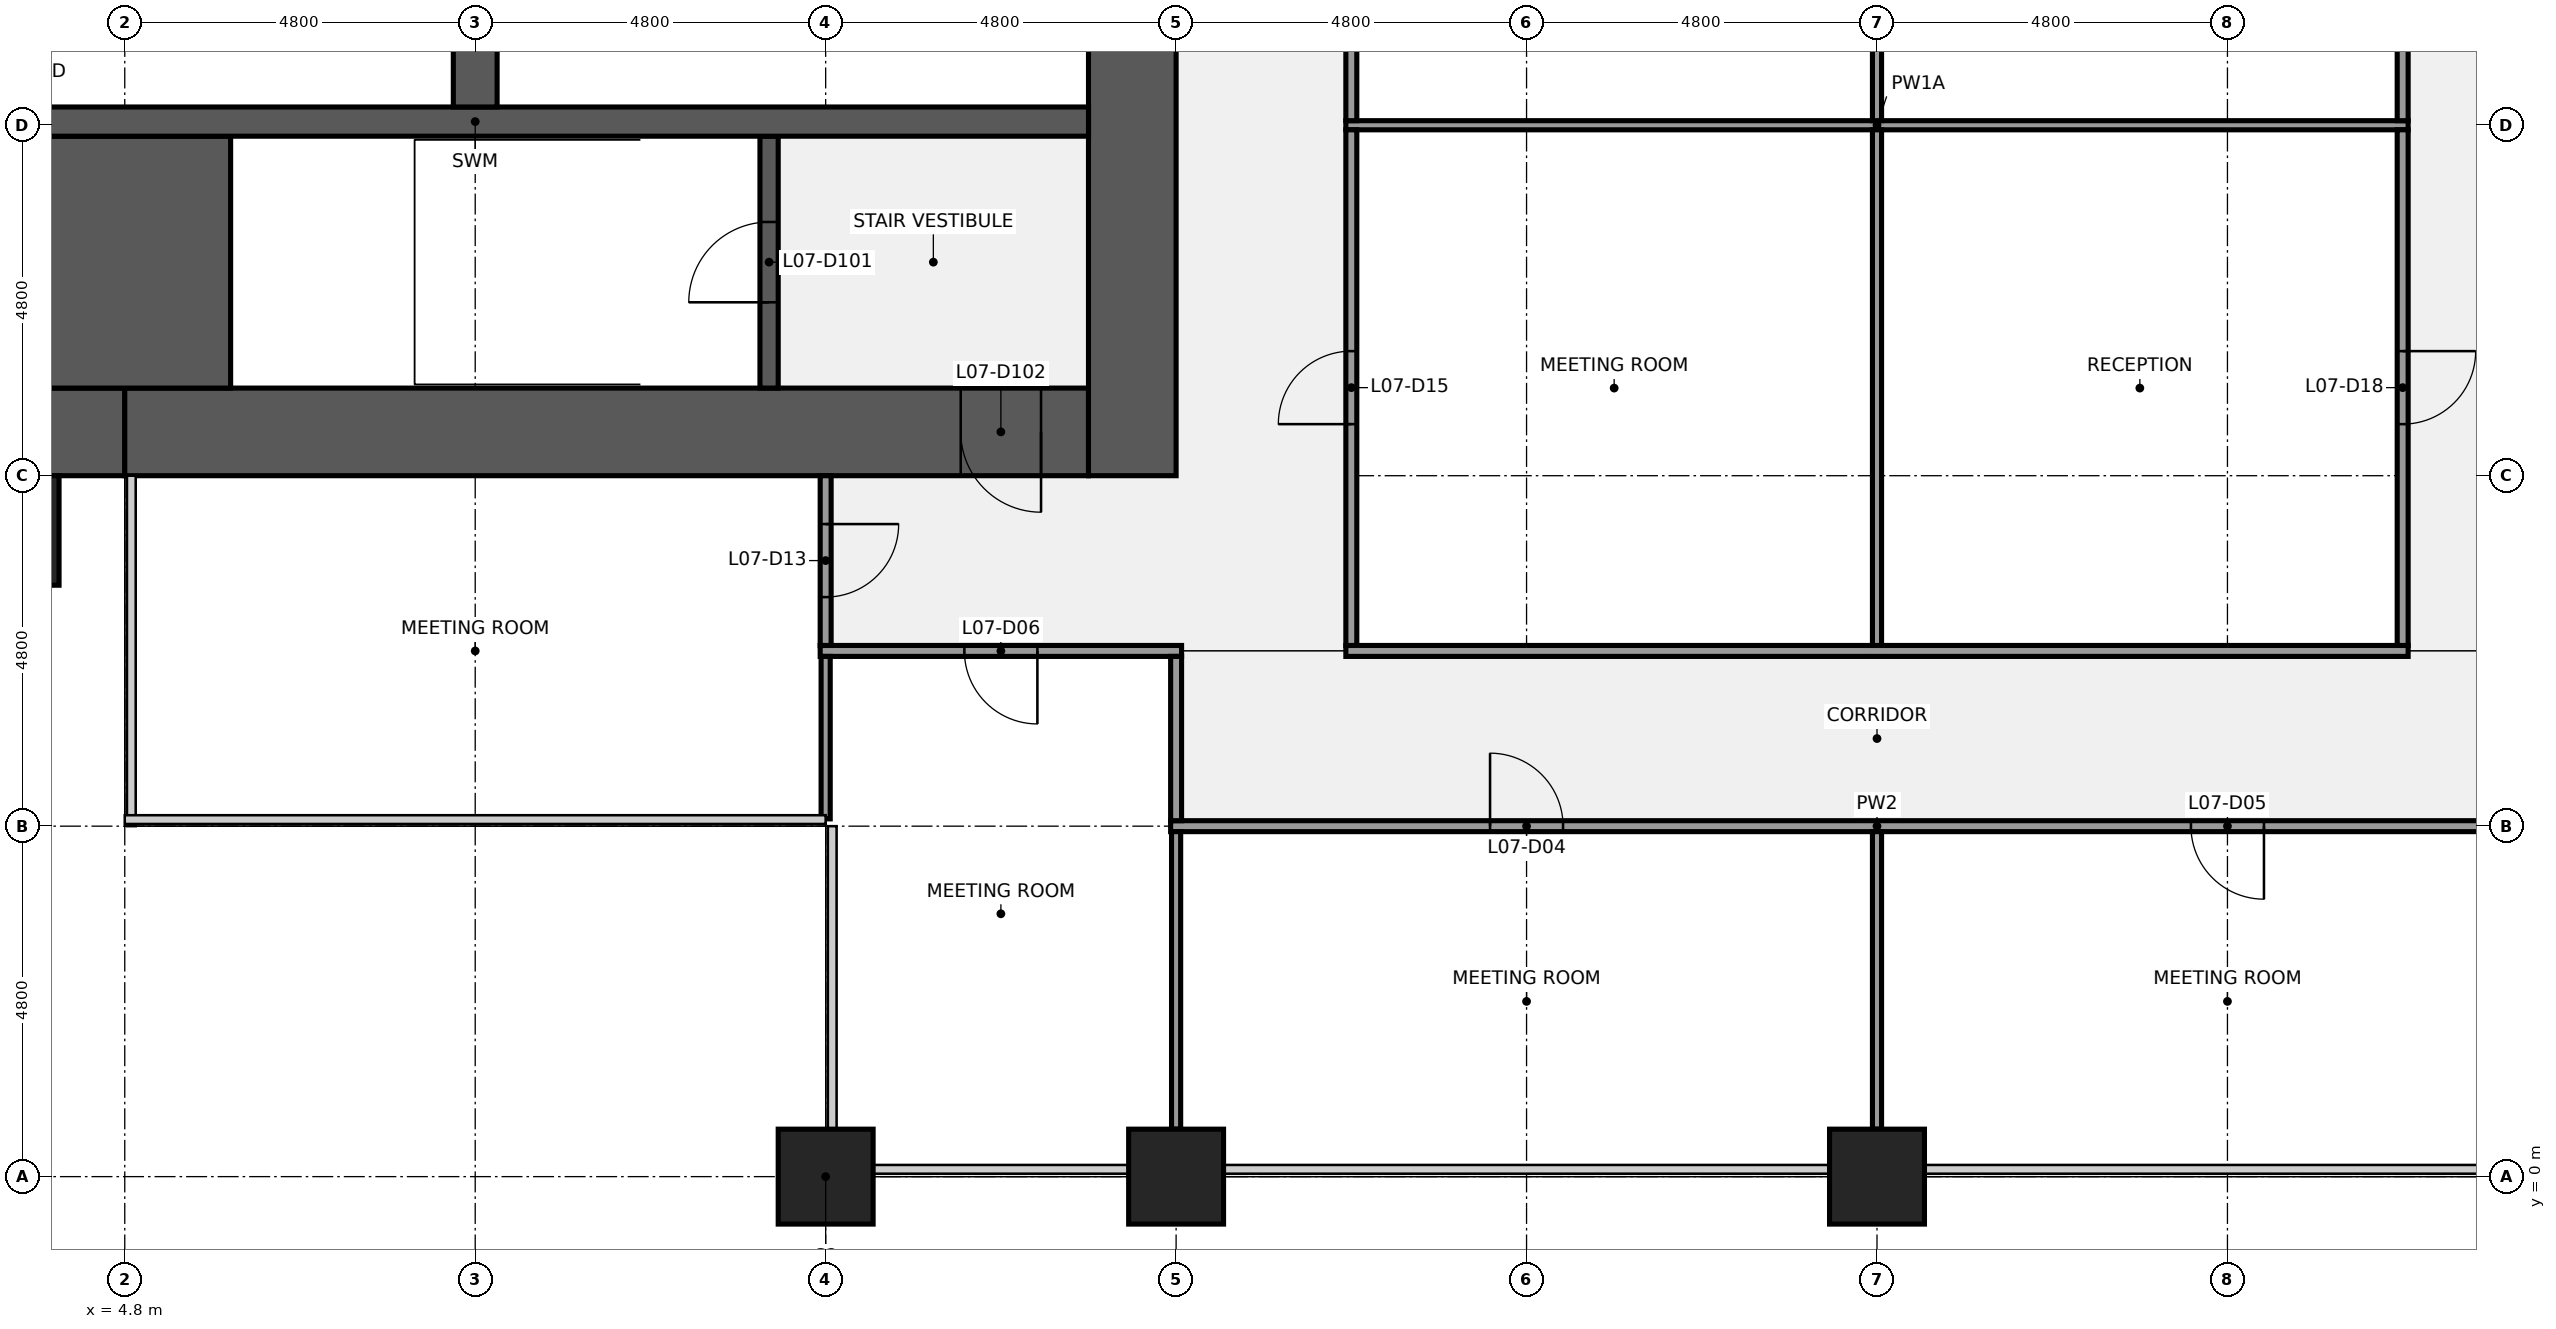
"""IFC4 building model, lengths in metres.
Left out: names, types, materials, properties, quantities, classifications, styles, units other than length and angle.
Written with IfcOpenShell. Run it as: python <this file> out.ifc"""

import sys

from ifc_helpers import new_model, si_unit, direction, frame, frame_2d, origin, origin_2d, place, context, subcontext, project, spatial, rectangle, extrude, element, fill, save


model = new_model("IFC4")
c1 = context("Model", 3, precision=1e-05, world=origin(), true_north=direction((0.0, 1.0)))
c2 = subcontext(c1, "Body", "Model", "MODEL_VIEW")
j1 = project(units=[si_unit("LENGTHUNIT", "METRE"), si_unit("PLANEANGLEUNIT", "RADIAN")], contexts=[c1])
p1 = place(None, origin())
s1 = spatial("IfcSite", under=j1, at=p1, CompositionType="ELEMENT")
p2 = place(p1, origin())
s2 = spatial("IfcBuilding", under=s1, at=p2, CompositionType="ELEMENT")
p3 = place(p2, frame((0.0, 0.0, 39.0)))
s3 = spatial("IfcBuildingStorey", under=s2, at=p3, CompositionType="ELEMENT", Elevation=39.0)
for number, where, z_axis, x_axis in (
    (1, (14.4, 0.0, 0.0), (0.0, 0.0, 1.0), (1.0, 0.0, 0.0)),
    (2, (19.2, 0.0, 0.0), (0.0, 0.0, 1.0), (1.0, 0.0, 0.0)),
    (3, (28.8, 0.0, 0.0), (0.0, 0.0, 1.0), (1.0, 0.0, 0.0)),
):
    element("IfcColumn", number, at=place(p3, frame(where, z_axis=z_axis, x_axis=x_axis)), inside=s3, PredefinedType="COLUMN", context=c2, shape_type="SweptSolid", body=[
        extrude(rectangle(XDim=1.3, YDim=1.3, at=origin_2d()), origin(), (0.0, 0.0, 1.0), 4.0),
    ])
p4 = place(p3, frame((4.8, 10.2, 0.0), z_axis=(0.0, 0.0, 1.0), x_axis=(-1.0, 0.0, 0.0)))
e4 = element("IfcWall", 4, at=p4, inside=s3, PredefinedType="SHEAR", context=c2, shape_type="SweptSolid", body=[
    extrude(rectangle(XDim=3.6, YDim=1.2, at=frame_2d((1.8, 0.0))), origin(), (0.0, 0.0, 1.0), 3.84),
])
p5 = place(p3, frame((18.0, 10.2, 0.0), z_axis=(0.0, 0.0, 1.0), x_axis=(-1.0, 0.0, 0.0)))
e5 = element("IfcWall", 5, at=p5, inside=s3, PredefinedType="SHEAR", context=c2, shape_type="SweptSolid", body=[
    extrude(rectangle(XDim=13.2, YDim=1.2, at=frame_2d((6.6, 0.0))), origin(), (0.0, 0.0, 1.0), 3.84),
])
p6 = place(p5, frame((0.65, 0.0, 0.0)))
e6 = element("IfcOpeningElement", 6, at=p6, cuts=e5, PredefinedType="OPENING", context=c2, shape_type="SweptSolid", body=[
    extrude(rectangle(XDim=1.1, YDim=2.1, at=frame_2d((0.55, 1.05))), frame((0.0, 0.61, 0.0), z_axis=(0.0, -1.0, 0.0), x_axis=(1.0, 0.0, 0.0)), (0.0, 0.0, 1.0), 1.22),
])
p7 = place(p3, frame((18.6, 38.4, 0.0), z_axis=(0.0, 0.0, 1.0), x_axis=(0.0, -1.0, 0.0)))
e7 = element("IfcWall", 7, at=p7, inside=s3, PredefinedType="SHEAR", context=c2, shape_type="SweptSolid", body=[
    extrude(rectangle(XDim=28.8, YDim=1.2, at=frame_2d((14.4, 0.0))), origin(), (0.0, 0.0, 1.0), 3.84),
])
p8 = place(p7, frame((18.3, 0.0, 0.0)))
e8 = element("IfcOpeningElement", 8, at=p8, cuts=e7, PredefinedType="OPENING", context=c2, shape_type="SweptSolid", body=[
    extrude(rectangle(XDim=1.8, YDim=2.1, at=frame_2d((0.9, 1.05))), frame((0.0, 0.61, 0.0), z_axis=(0.0, -1.0, 0.0), x_axis=(1.0, 0.0, 0.0)), (0.0, 0.0, 1.0), 1.22),
])
p9 = place(p7, frame((8.7, 0.0, 0.0)))
e9 = element("IfcOpeningElement", 9, at=p9, cuts=e7, PredefinedType="OPENING", context=c2, shape_type="SweptSolid", body=[
    extrude(rectangle(XDim=1.8, YDim=2.1, at=frame_2d((0.9, 1.05))), frame((0.0, 0.61, 0.0), z_axis=(0.0, -1.0, 0.0), x_axis=(1.0, 0.0, 0.0)), (0.0, 0.0, 1.0), 1.22),
])
p10 = place(p3, frame((1.2, 12.525, 0.0), z_axis=(0.0, 0.0, 1.0), x_axis=(1.0, 0.0, 0.0)))
e10 = element("IfcWall", 10, at=p10, inside=s3, PredefinedType="SHEAR", context=c2, shape_type="SweptSolid", body=[
    extrude(rectangle(XDim=5.05, YDim=3.45, at=frame_2d((2.525, 0.0))), origin(), (0.0, 0.0, 1.0), 3.84),
])
p11 = place(p3, frame((13.625, 10.8, 0.0), z_axis=(0.0, 0.0, 1.0), x_axis=(0.0, 1.0, 0.0)))
e11 = element("IfcWall", 11, at=p11, inside=s3, PredefinedType="SHEAR", context=c2, shape_type="SweptSolid", body=[
    extrude(rectangle(XDim=3.45, YDim=0.25, at=frame_2d((1.725, 0.0))), origin(), (0.0, 0.0, 1.0), 3.84),
])
p12 = place(p11, frame((1.175, 0.0, 0.0)))
e12 = element("IfcOpeningElement", 12, at=p12, cuts=e11, PredefinedType="OPENING", context=c2, shape_type="SweptSolid", body=[
    extrude(rectangle(XDim=1.1, YDim=2.1, at=frame_2d((0.55, 1.05))), frame((0.0, 0.135, 0.0), z_axis=(0.0, -1.0, 0.0), x_axis=(1.0, 0.0, 0.0)), (0.0, 0.0, 1.0), 0.27),
])
p13 = place(p3, frame((1.2, 14.45, 0.0), z_axis=(0.0, 0.0, 1.0), x_axis=(1.0, 0.0, 0.0)))
e13 = element("IfcWall", 13, at=p13, inside=s3, PredefinedType="SHEAR", context=c2, shape_type="SweptSolid", body=[
    extrude(rectangle(XDim=16.8, YDim=0.4, at=frame_2d((8.4, 0.0))), origin(), (0.0, 0.0, 1.0), 3.84),
])
p14 = place(p3, frame((9.6, 14.65, 0.0), z_axis=(0.0, 0.0, 1.0), x_axis=(0.0, 1.0, 0.0)))
e14 = element("IfcWall", 14, at=p14, inside=s3, PredefinedType="SHEAR", context=c2, shape_type="SweptSolid", body=[
    extrude(rectangle(XDim=2.6, YDim=0.6, at=frame_2d((1.3, 0.0))), origin(), (0.0, 0.0, 1.0), 3.84),
])
p15 = place(p3, frame((19.125, 4.8, 0.0), z_axis=(0.0, 0.0, 1.0), x_axis=(1.0, 0.0, 0.0)))
e15 = element("IfcWall", 15, at=p15, inside=s3, PredefinedType="PARTITIONING", context=c2, shape_type="SweptSolid", body=[
    extrude(rectangle(XDim=19.35, YDim=0.15, at=frame_2d((9.675, 0.0))), origin(), (0.0, 0.0, 1.0), 2.87),
])
p16 = place(p15, frame((4.375, 0.0, 0.0)))
e16 = element("IfcOpeningElement", 16, at=p16, cuts=e15, PredefinedType="OPENING", context=c2, shape_type="SweptSolid", body=[
    extrude(rectangle(XDim=1.0, YDim=2.1, at=frame_2d((0.5, 1.05))), frame((0.0, 0.085, 0.0), z_axis=(0.0, -1.0, 0.0), x_axis=(1.0, 0.0, 0.0)), (0.0, 0.0, 1.0), 0.17),
])
p17 = place(p15, frame((13.975, 0.0, 0.0)))
e17 = element("IfcOpeningElement", 17, at=p17, cuts=e15, PredefinedType="OPENING", context=c2, shape_type="SweptSolid", body=[
    extrude(rectangle(XDim=1.0, YDim=2.1, at=frame_2d((0.5, 1.05))), frame((0.0, 0.085, 0.0), z_axis=(0.0, -1.0, 0.0), x_axis=(1.0, 0.0, 0.0)), (0.0, 0.0, 1.0), 0.17),
])
p18 = place(p3, frame((14.325, 7.2, 0.0), z_axis=(0.0, 0.0, 1.0), x_axis=(1.0, 0.0, 0.0)))
e18 = element("IfcWall", 18, at=p18, inside=s3, PredefinedType="PARTITIONING", context=c2, shape_type="SweptSolid", body=[
    extrude(rectangle(XDim=4.95, YDim=0.15, at=frame_2d((2.475, 0.0))), origin(), (0.0, 0.0, 1.0), 2.87),
])
p19 = place(p18, frame((1.975, 0.0, 0.0)))
e19 = element("IfcOpeningElement", 19, at=p19, cuts=e18, PredefinedType="OPENING", context=c2, shape_type="SweptSolid", body=[
    extrude(rectangle(XDim=1.0, YDim=2.1, at=frame_2d((0.5, 1.05))), frame((0.0, 0.085, 0.0), z_axis=(0.0, -1.0, 0.0), x_axis=(1.0, 0.0, 0.0)), (0.0, 0.0, 1.0), 0.17),
])
p20 = place(p3, frame((21.525, 7.2, 0.0), z_axis=(0.0, 0.0, 1.0), x_axis=(1.0, 0.0, 0.0)))
e20 = element("IfcWall", 20, at=p20, inside=s3, PredefinedType="PARTITIONING", context=c2, shape_type="SweptSolid", body=[
    extrude(rectangle(XDim=14.55, YDim=0.15, at=frame_2d((7.275, 0.0))), origin(), (0.0, 0.0, 1.0), 2.87),
])
p21 = place(p3, frame((21.525, 14.4, 0.0), z_axis=(0.0, 0.0, 1.0), x_axis=(1.0, 0.0, 0.0)))
e21 = element("IfcWall", 21, at=p21, inside=s3, PredefinedType="PARTITIONING", context=c2, shape_type="SweptSolid", body=[
    extrude(rectangle(XDim=14.55, YDim=0.125, at=frame_2d((7.275, 0.0))), origin(), (0.0, 0.0, 1.0), 2.87),
])
p22 = place(p3, frame((14.4, 4.9, 0.0), z_axis=(0.0, 0.0, 1.0), x_axis=(0.0, 1.0, 0.0)))
e22 = element("IfcWall", 22, at=p22, inside=s3, PredefinedType="PARTITIONING", context=c2, shape_type="SweptSolid", body=[
    extrude(rectangle(XDim=2.225, YDim=0.125, at=frame_2d((1.113, 0.0))), origin(), (0.0, 0.0, 1.0), 2.87),
])
p23 = place(p3, frame((14.4, 7.275, 0.0), z_axis=(0.0, 0.0, 1.0), x_axis=(0.0, 1.0, 0.0)))
e23 = element("IfcWall", 23, at=p23, inside=s3, PredefinedType="PARTITIONING", context=c2, shape_type="SweptSolid", body=[
    extrude(rectangle(XDim=2.325, YDim=0.15, at=frame_2d((1.163, 0.0))), origin(), (0.0, 0.0, 1.0), 2.87),
])
p24 = place(p23, frame((0.663, 0.0, 0.0)))
e24 = element("IfcOpeningElement", 24, at=p24, cuts=e23, PredefinedType="OPENING", context=c2, shape_type="SweptSolid", body=[
    extrude(rectangle(XDim=1.0, YDim=2.1, at=frame_2d((0.5, 1.05))), frame((0.0, 0.085, 0.0), z_axis=(0.0, -1.0, 0.0), x_axis=(1.0, 0.0, 0.0)), (0.0, 0.0, 1.0), 0.17),
])
p25 = place(p3, frame((19.2, 0.65, 0.0), z_axis=(0.0, 0.0, 1.0), x_axis=(0.0, 1.0, 0.0)))
e25 = element("IfcWall", 25, at=p25, inside=s3, PredefinedType="PARTITIONING", context=c2, shape_type="SweptSolid", body=[
    extrude(rectangle(XDim=4.075, YDim=0.125, at=frame_2d((2.038, 0.0))), origin(), (0.0, 0.0, 1.0), 2.87),
])
p26 = place(p3, frame((19.2, 4.875, 0.0), z_axis=(0.0, 0.0, 1.0), x_axis=(0.0, 1.0, 0.0)))
e26 = element("IfcWall", 26, at=p26, inside=s3, PredefinedType="PARTITIONING", context=c2, shape_type="SweptSolid", body=[
    extrude(rectangle(XDim=2.25, YDim=0.15, at=frame_2d((1.125, 0.0))), origin(), (0.0, 0.0, 1.0), 2.87),
])
p27 = place(p3, frame((21.6, 7.275, 0.0), z_axis=(0.0, 0.0, 1.0), x_axis=(0.0, 1.0, 0.0)))
e27 = element("IfcWall", 27, at=p27, inside=s3, PredefinedType="PARTITIONING", context=c2, shape_type="SweptSolid", body=[
    extrude(rectangle(XDim=7.062, YDim=0.15, at=frame_2d((3.531, 0.0))), origin(), (0.0, 0.0, 1.0), 2.87),
])
p28 = place(p27, frame((3.031, 0.0, 0.0)))
e28 = element("IfcOpeningElement", 28, at=p28, cuts=e27, PredefinedType="OPENING", context=c2, shape_type="SweptSolid", body=[
    extrude(rectangle(XDim=1.0, YDim=2.1, at=frame_2d((0.5, 1.05))), frame((0.0, 0.085, 0.0), z_axis=(0.0, -1.0, 0.0), x_axis=(1.0, 0.0, 0.0)), (0.0, 0.0, 1.0), 0.17),
])
p29 = place(p3, frame((21.6, 14.462, 0.0), z_axis=(0.0, 0.0, 1.0), x_axis=(0.0, 1.0, 0.0)))
e29 = element("IfcWall", 29, at=p29, inside=s3, PredefinedType="PARTITIONING", context=c2, shape_type="SweptSolid", body=[
    extrude(rectangle(XDim=9.475, YDim=0.15, at=frame_2d((4.738, 0.0))), origin(), (0.0, 0.0, 1.0), 2.87),
])
p30 = place(p29, frame((4.238, 0.0, 0.0)))
e30 = element("IfcOpeningElement", 30, at=p30, cuts=e29, PredefinedType="OPENING", context=c2, shape_type="SweptSolid", body=[
    extrude(rectangle(XDim=1.0, YDim=2.1, at=frame_2d((0.5, 1.05))), frame((0.0, 0.085, 0.0), z_axis=(0.0, -1.0, 0.0), x_axis=(1.0, 0.0, 0.0)), (0.0, 0.0, 1.0), 0.17),
])
p31 = place(p3, frame((28.8, 0.65, 0.0), z_axis=(0.0, 0.0, 1.0), x_axis=(0.0, 1.0, 0.0)))
e31 = element("IfcWall", 31, at=p31, inside=s3, PredefinedType="PARTITIONING", context=c2, shape_type="SweptSolid", body=[
    extrude(rectangle(XDim=4.075, YDim=0.125, at=frame_2d((2.038, 0.0))), origin(), (0.0, 0.0, 1.0), 2.87),
])
p32 = place(p3, frame((28.8, 7.275, 0.0), z_axis=(0.0, 0.0, 1.0), x_axis=(0.0, 1.0, 0.0)))
e32 = element("IfcWall", 32, at=p32, inside=s3, PredefinedType="PARTITIONING", context=c2, shape_type="SweptSolid", body=[
    extrude(rectangle(XDim=7.062, YDim=0.125, at=frame_2d((3.531, 0.0))), origin(), (0.0, 0.0, 1.0), 2.87),
])
p33 = place(p3, frame((28.8, 14.462, 0.0), z_axis=(0.0, 0.0, 1.0), x_axis=(0.0, 1.0, 0.0)))
e33 = element("IfcWall", 33, at=p33, inside=s3, PredefinedType="PARTITIONING", context=c2, shape_type="SweptSolid", body=[
    extrude(rectangle(XDim=9.475, YDim=0.125, at=frame_2d((4.738, 0.0))), origin(), (0.0, 0.0, 1.0), 2.87),
])
p34 = place(p3, frame((36.0, 7.275, 0.0), z_axis=(0.0, 0.0, 1.0), x_axis=(0.0, 1.0, 0.0)))
e34 = element("IfcWall", 34, at=p34, inside=s3, PredefinedType="PARTITIONING", context=c2, shape_type="SweptSolid", body=[
    extrude(rectangle(XDim=7.062, YDim=0.15, at=frame_2d((3.531, 0.0))), origin(), (0.0, 0.0, 1.0), 2.87),
])
p35 = place(p34, frame((3.031, 0.0, 0.0)))
e35 = element("IfcOpeningElement", 35, at=p35, cuts=e34, PredefinedType="OPENING", context=c2, shape_type="SweptSolid", body=[
    extrude(rectangle(XDim=1.0, YDim=2.1, at=frame_2d((0.5, 1.05))), frame((0.0, 0.085, 0.0), z_axis=(0.0, -1.0, 0.0), x_axis=(1.0, 0.0, 0.0)), (0.0, 0.0, 1.0), 0.17),
])
p36 = place(p3, frame((36.0, 14.462, 0.0), z_axis=(0.0, 0.0, 1.0), x_axis=(0.0, 1.0, 0.0)))
e36 = element("IfcWall", 36, at=p36, inside=s3, PredefinedType="PARTITIONING", context=c2, shape_type="SweptSolid", body=[
    extrude(rectangle(XDim=9.475, YDim=0.15, at=frame_2d((4.738, 0.0))), origin(), (0.0, 0.0, 1.0), 2.87),
])
p37 = place(p36, frame((4.238, 0.0, 0.0)))
e37 = element("IfcOpeningElement", 37, at=p37, cuts=e36, PredefinedType="OPENING", context=c2, shape_type="SweptSolid", body=[
    extrude(rectangle(XDim=1.0, YDim=2.1, at=frame_2d((0.5, 1.05))), frame((0.0, 0.085, 0.0), z_axis=(0.0, -1.0, 0.0), x_axis=(1.0, 0.0, 0.0)), (0.0, 0.0, 1.0), 0.17),
])
p38 = place(p3, frame((2.4, 8.85, 0.0), z_axis=(0.0, 0.0, 1.0), x_axis=(1.0, 0.0, 0.0)))
e38 = element("IfcColumn", 38, at=p38, inside=s3, PredefinedType="PILASTER", context=c2, shape_type="SweptSolid", body=[
    extrude(rectangle(XDim=3.0, YDim=1.5, at=origin_2d()), origin(), (0.0, 0.0, 1.0), 4.0),
])
for number, where, z_axis, x_axis in (
    (39, (14.4, -1.075, 0.0), (0.0, 0.0, 1.0), (1.0, 0.0, 0.0)),
    (40, (19.2, -1.075, 0.0), (0.0, 0.0, 1.0), (1.0, 0.0, 0.0)),
    (41, (38.4, -1.075, 0.0), (0.0, 0.0, 1.0), (1.0, 0.0, 0.0)),
):
    element("IfcColumn", number, at=place(p3, frame(where, z_axis=z_axis, x_axis=x_axis)), inside=s3, PredefinedType="PILASTER", context=c2, shape_type="SweptSolid", body=[
        extrude(rectangle(XDim=4.2, YDim=0.85, at=origin_2d()), origin(), (0.0, 0.0, 1.0), 4.0),
    ])
p39 = place(p12, origin())
e42 = element("IfcDoor", 42, at=p39, inside=s3, OperationType="SINGLE_SWING_LEFT", PredefinedType="DOOR", context=c2, shape_type="SweptSolid", body=[
    extrude(rectangle(XDim=1.1, YDim=2.1, at=frame_2d((0.55, 1.05))), frame((0.0, 0.025, 0.0), z_axis=(0.0, -1.0, 0.0), x_axis=(1.0, 0.0, 0.0)), (0.0, 0.0, 1.0), 0.05),
])
fill(e12, e42)
p40 = place(p6, origin())
e43 = element("IfcDoor", 43, at=p40, inside=s3, OperationType="SINGLE_SWING_LEFT", PredefinedType="DOOR", context=c2, shape_type="SweptSolid", body=[
    extrude(rectangle(XDim=1.1, YDim=2.1, at=frame_2d((0.55, 1.05))), frame((0.0, 0.025, 0.0), z_axis=(0.0, -1.0, 0.0), x_axis=(1.0, 0.0, 0.0)), (0.0, 0.0, 1.0), 0.05),
])
fill(e6, e43)
p41 = place(p16, origin())
e44 = element("IfcDoor", 44, at=p41, inside=s3, OperationType="SINGLE_SWING_LEFT", PredefinedType="DOOR", context=c2, shape_type="SweptSolid", body=[
    extrude(rectangle(XDim=1.0, YDim=2.1, at=frame_2d((0.5, 1.05))), frame((0.0, 0.025, 0.0), z_axis=(0.0, -1.0, 0.0), x_axis=(1.0, 0.0, 0.0)), (0.0, 0.0, 1.0), 0.05),
])
fill(e16, e44)
p42 = place(p17, origin())
e45 = element("IfcDoor", 45, at=p42, inside=s3, OperationType="SINGLE_SWING_RIGHT", PredefinedType="DOOR", context=c2, shape_type="SweptSolid", body=[
    extrude(rectangle(XDim=1.0, YDim=2.1, at=frame_2d((0.5, 1.05))), frame((0.0, 0.025, 0.0), z_axis=(0.0, -1.0, 0.0), x_axis=(1.0, 0.0, 0.0)), (0.0, 0.0, 1.0), 0.05),
])
fill(e17, e45)
p43 = place(p19, origin())
e46 = element("IfcDoor", 46, at=p43, inside=s3, OperationType="SINGLE_SWING_RIGHT", PredefinedType="DOOR", context=c2, shape_type="SweptSolid", body=[
    extrude(rectangle(XDim=1.0, YDim=2.1, at=frame_2d((0.5, 1.05))), frame((0.0, 0.025, 0.0), z_axis=(0.0, -1.0, 0.0), x_axis=(1.0, 0.0, 0.0)), (0.0, 0.0, 1.0), 0.05),
])
fill(e19, e46)
p44 = place(p24, origin())
e47 = element("IfcDoor", 47, at=p44, inside=s3, OperationType="SINGLE_SWING_RIGHT", PredefinedType="DOOR", context=c2, shape_type="SweptSolid", body=[
    extrude(rectangle(XDim=1.0, YDim=2.1, at=frame_2d((0.5, 1.05))), frame((0.0, 0.025, 0.0), z_axis=(0.0, -1.0, 0.0), x_axis=(1.0, 0.0, 0.0)), (0.0, 0.0, 1.0), 0.05),
])
fill(e24, e47)
p45 = place(p28, origin())
e48 = element("IfcDoor", 48, at=p45, inside=s3, OperationType="SINGLE_SWING_LEFT", PredefinedType="DOOR", context=c2, shape_type="SweptSolid", body=[
    extrude(rectangle(XDim=1.0, YDim=2.1, at=frame_2d((0.5, 1.05))), frame((0.0, 0.025, 0.0), z_axis=(0.0, -1.0, 0.0), x_axis=(1.0, 0.0, 0.0)), (0.0, 0.0, 1.0), 0.05),
])
fill(e28, e48)
p46 = place(p35, origin())
e49 = element("IfcDoor", 49, at=p46, inside=s3, OperationType="SINGLE_SWING_RIGHT", PredefinedType="DOOR", context=c2, shape_type="SweptSolid", body=[
    extrude(rectangle(XDim=1.0, YDim=2.1, at=frame_2d((0.5, 1.05))), frame((0.0, 0.025, 0.0), z_axis=(0.0, -1.0, 0.0), x_axis=(1.0, 0.0, 0.0)), (0.0, 0.0, 1.0), 0.05),
])
fill(e35, e49)
save(model, sys.argv[1])
